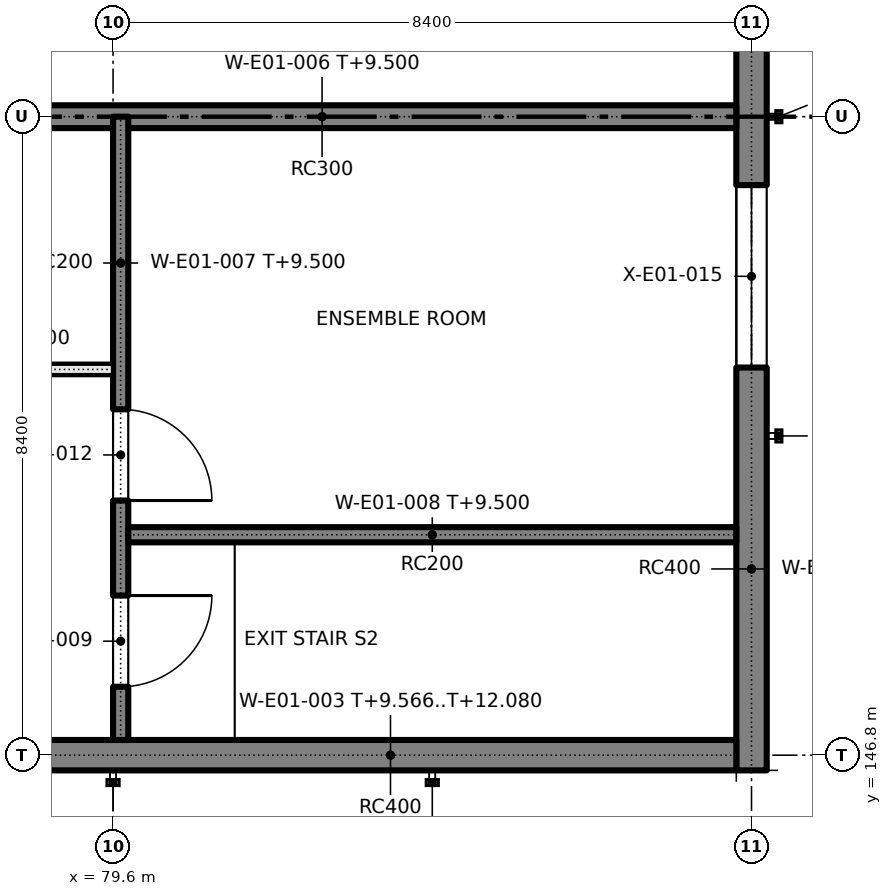
"""IFC4 building model, lengths in metres.
Left out: names, types, materials, properties, quantities, classifications, styles, units other than length and angle.
Written with IfcOpenShell. Run it as: python <this file> out.ifc"""

import sys

from ifc_helpers import new_model, si_unit, direction, frame, frame_2d, origin, place, context, subcontext, project, spatial, polyline, rectangle, outline, extrude, element, fill, save


model = new_model("IFC4")
c1 = context("Model", 3, precision=1e-05, world=origin(), true_north=direction((0.0, 1.0)))
c2 = subcontext(c1, "Body", "Model", "MODEL_VIEW")
j1 = project(units=[si_unit("LENGTHUNIT", "METRE"), si_unit("PLANEANGLEUNIT", "RADIAN")], contexts=[c1])
p1 = place(None, origin())
s1 = spatial("IfcSite", under=j1, at=p1, CompositionType="ELEMENT")
p2 = place(p1, origin())
s2 = spatial("IfcBuilding", under=s1, at=p2, CompositionType="ELEMENT")
p3 = place(p2, frame((0.0, 0.0, 5.4)))
s3 = spatial("IfcBuildingStorey", under=s2, at=p3, CompositionType="ELEMENT", Elevation=5.4)
p4 = place(p3, frame((88.0, 146.6, 0.0), z_axis=(0.0, 0.0, 1.0), x_axis=(0.0, 1.0, 0.0)))
e1 = element("IfcWall", 1, at=p4, inside=s3, PredefinedType="SOLIDWALL", context=c2, shape_type="SweptSolid", body=[
    extrude(rectangle(XDim=25.6, YDim=0.4, at=frame_2d((12.8, 0.0))), origin(), (0.0, 0.0, 1.0), 4.1),
])
p5 = place(p4, frame((5.3, 0.0, 0.9)))
e2 = element("IfcOpeningElement", 2, at=p5, cuts=e1, PredefinedType="OPENING", context=c2, shape_type="SweptSolid", body=[
    extrude(rectangle(XDim=2.4, YDim=2.4, at=frame_2d((1.2, 1.2))), frame((0.0, 0.21, 0.0), z_axis=(0.0, -1.0, 0.0), x_axis=(1.0, 0.0, 0.0)), (0.0, 0.0, 1.0), 0.42),
])
p6 = place(p4, frame((9.5, 0.0, 1.5)))
e3 = element("IfcOpeningElement", 3, at=p6, cuts=e1, PredefinedType="OPENING", context=c2, shape_type="SweptSolid", body=[
    extrude(rectangle(XDim=2.4, YDim=2.1, at=frame_2d((1.2, 1.05))), frame((0.0, 0.21, 0.0), z_axis=(0.0, -1.0, 0.0), x_axis=(1.0, 0.0, 0.0)), (0.0, 0.0, 1.0), 0.42),
])
p7 = place(p4, frame((13.7, 0.0, 1.5)))
e4 = element("IfcOpeningElement", 4, at=p7, cuts=e1, PredefinedType="OPENING", context=c2, shape_type="SweptSolid", body=[
    extrude(rectangle(XDim=2.4, YDim=2.1, at=frame_2d((1.2, 1.05))), frame((0.0, 0.21, 0.0), z_axis=(0.0, -1.0, 0.0), x_axis=(1.0, 0.0, 0.0)), (0.0, 0.0, 1.0), 0.42),
])
p8 = place(p4, frame((17.9, 0.0, 1.5)))
e5 = element("IfcOpeningElement", 5, at=p8, cuts=e1, PredefinedType="OPENING", context=c2, shape_type="SweptSolid", body=[
    extrude(rectangle(XDim=2.4, YDim=2.1, at=frame_2d((1.2, 1.05))), frame((0.0, 0.21, 0.0), z_axis=(0.0, -1.0, 0.0), x_axis=(1.0, 0.0, 0.0)), (0.0, 0.0, 1.0), 0.42),
])
p9 = place(p4, frame((22.1, 0.0, 1.5)))
e6 = element("IfcOpeningElement", 6, at=p9, cuts=e1, PredefinedType="OPENING", context=c2, shape_type="SweptSolid", body=[
    extrude(rectangle(XDim=2.4, YDim=2.1, at=frame_2d((1.2, 1.05))), frame((0.0, 0.21, 0.0), z_axis=(0.0, -1.0, 0.0), x_axis=(1.0, 0.0, 0.0)), (0.0, 0.0, 1.0), 0.42),
])
p10 = place(p3, frame((63.0, 146.8, 0.0), z_axis=(0.0, 0.0, 1.0), x_axis=(1.0, 0.0, 0.0)))
e7 = element("IfcWall", 7, at=p10, inside=s3, PredefinedType="SOLIDWALL", context=c2, shape_type="SweptSolid", body=[
    extrude(outline(polyline([(0.0, 0.0), (24.8, 0.0), (24.8, 4.166), (22.802, 4.935), (20.721, 5.574), (18.641, 6.063), (16.561, 6.407), (14.48, 6.612), (12.4, 6.68), (10.32, 6.612), (8.239, 6.407), (6.159, 6.063), (4.079, 5.574), (1.998, 4.935), (0.0, 4.166), (0.0, 0.0)])), frame((0.0, 0.2, 0.0), z_axis=(0.0, -1.0, 0.0), x_axis=(1.0, 0.0, 0.0)), (0.0, 0.0, 1.0), 0.4),
])
p11 = place(p10, frame((0.7, 0.0, 0.9)))
e8 = element("IfcOpeningElement", 8, at=p11, cuts=e7, PredefinedType="OPENING", context=c2, shape_type="SweptSolid", body=[
    extrude(rectangle(XDim=2.4, YDim=2.4, at=frame_2d((1.2, 1.2))), frame((0.0, 0.21, 0.0), z_axis=(0.0, -1.0, 0.0), x_axis=(1.0, 0.0, 0.0)), (0.0, 0.0, 1.0), 0.42),
])
p12 = place(p10, frame((4.9, 0.0, 0.9)))
e9 = element("IfcOpeningElement", 9, at=p12, cuts=e7, PredefinedType="OPENING", context=c2, shape_type="SweptSolid", body=[
    extrude(rectangle(XDim=2.4, YDim=2.4, at=frame_2d((1.2, 1.2))), frame((0.0, 0.21, 0.0), z_axis=(0.0, -1.0, 0.0), x_axis=(1.0, 0.0, 0.0)), (0.0, 0.0, 1.0), 0.42),
])
p13 = place(p10, frame((9.1, 0.0, 0.9)))
e10 = element("IfcOpeningElement", 10, at=p13, cuts=e7, PredefinedType="OPENING", context=c2, shape_type="SweptSolid", body=[
    extrude(rectangle(XDim=2.4, YDim=2.4, at=frame_2d((1.2, 1.2))), frame((0.0, 0.21, 0.0), z_axis=(0.0, -1.0, 0.0), x_axis=(1.0, 0.0, 0.0)), (0.0, 0.0, 1.0), 0.42),
])
p14 = place(p10, frame((13.3, 0.0, 0.9)))
e11 = element("IfcOpeningElement", 11, at=p14, cuts=e7, PredefinedType="OPENING", context=c2, shape_type="SweptSolid", body=[
    extrude(rectangle(XDim=2.4, YDim=2.4, at=frame_2d((1.2, 1.2))), frame((0.0, 0.21, 0.0), z_axis=(0.0, -1.0, 0.0), x_axis=(1.0, 0.0, 0.0)), (0.0, 0.0, 1.0), 0.42),
])
p15 = place(p3, frame((71.25, 155.2, 0.0), z_axis=(0.0, 0.0, 1.0), x_axis=(1.0, 0.0, 0.0)))
e12 = element("IfcWall", 12, at=p15, inside=s3, PredefinedType="SOLIDWALL", context=c2, shape_type="SweptSolid", body=[
    extrude(rectangle(XDim=16.55, YDim=0.3, at=frame_2d((8.275, 0.0))), origin(), (0.0, 0.0, 1.0), 4.1),
])
p16 = place(p15, frame((2.65, 0.0, 1.2)))
e13 = element("IfcOpeningElement", 13, at=p16, cuts=e12, PredefinedType="OPENING", context=c2, shape_type="SweptSolid", body=[
    extrude(rectangle(XDim=3.0, YDim=1.2, at=frame_2d((1.5, 0.6))), frame((0.0, 0.16, 0.0), z_axis=(0.0, -1.0, 0.0), x_axis=(1.0, 0.0, 0.0)), (0.0, 0.0, 1.0), 0.32),
])
p17 = place(p3, frame((79.7, 147.0, 0.0), z_axis=(0.0, 0.0, 1.0), x_axis=(0.0, 1.0, 0.0)))
e14 = element("IfcWall", 14, at=p17, inside=s3, PredefinedType="SOLIDWALL", context=c2, shape_type="SweptSolid", body=[
    extrude(rectangle(XDim=8.2, YDim=0.2, at=frame_2d((4.1, 0.0))), origin(), (0.0, 0.0, 1.0), 4.1),
])
p18 = place(p17, frame((0.7, 0.0, 0.0)))
e15 = element("IfcOpeningElement", 15, at=p18, cuts=e14, PredefinedType="OPENING", context=c2, shape_type="SweptSolid", body=[
    extrude(rectangle(XDim=1.2, YDim=2.1, at=frame_2d((0.6, 1.05))), frame((0.0, 0.11, 0.0), z_axis=(0.0, -1.0, 0.0), x_axis=(1.0, 0.0, 0.0)), (0.0, 0.0, 1.0), 0.22),
])
p19 = place(p17, frame((3.15, 0.0, 0.0)))
e16 = element("IfcOpeningElement", 16, at=p19, cuts=e14, PredefinedType="OPENING", context=c2, shape_type="SweptSolid", body=[
    extrude(rectangle(XDim=1.2, YDim=2.1, at=frame_2d((0.6, 1.05))), frame((0.0, 0.11, 0.0), z_axis=(0.0, -1.0, 0.0), x_axis=(1.0, 0.0, 0.0)), (0.0, 0.0, 1.0), 0.22),
])
p20 = place(p3, frame((79.8, 149.7, 0.0), z_axis=(0.0, 0.0, 1.0), x_axis=(1.0, 0.0, 0.0)))
e17 = element("IfcWall", 17, at=p20, inside=s3, PredefinedType="SOLIDWALL", context=c2, shape_type="SweptSolid", body=[
    extrude(rectangle(XDim=8.0, YDim=0.2, at=frame_2d((4.0, 0.0))), origin(), (0.0, 0.0, 1.0), 4.1),
])
p21 = place(p3, frame((71.25, 151.875, 0.0), z_axis=(0.0, 0.0, 1.0), x_axis=(1.0, 0.0, 0.0)))
e18 = element("IfcWall", 18, at=p21, inside=s3, PredefinedType="PARTITIONING", context=c2, shape_type="SweptSolid", body=[
    extrude(rectangle(XDim=8.35, YDim=0.15, at=frame_2d((4.175, 0.0))), origin(), (0.0, 0.0, 1.0), 4.1),
])
p22 = place(p21, frame((3.65, 0.0, 0.0)))
e19 = element("IfcOpeningElement", 19, at=p22, cuts=e18, PredefinedType="OPENING", context=c2, shape_type="SweptSolid", body=[
    extrude(rectangle(XDim=1.0, YDim=2.1, at=frame_2d((0.5, 1.05))), frame((0.0, 0.085, 0.0), z_axis=(0.0, -1.0, 0.0), x_axis=(1.0, 0.0, 0.0)), (0.0, 0.0, 1.0), 0.17),
])
p23 = place(p5, origin())
e20 = element("IfcWindow", 20, at=p23, inside=s3, PartitioningType="SINGLE_PANEL", PredefinedType="WINDOW", context=c2, shape_type="SweptSolid", body=[
    extrude(rectangle(XDim=2.4, YDim=2.4, at=frame_2d((1.2, 1.2))), frame((0.0, 0.03, 0.0), z_axis=(0.0, -1.0, 0.0), x_axis=(1.0, 0.0, 0.0)), (0.0, 0.0, 1.0), 0.06),
])
fill(e2, e20)
p24 = place(p18, frame((1.2, 0.0, 0.0), z_axis=(0.0, 0.0, 1.0), x_axis=(-1.0, 0.0, 0.0)))
e21 = element("IfcDoor", 21, at=p24, inside=s3, OperationType="SINGLE_SWING_LEFT", PredefinedType="DOOR", context=c2, shape_type="SweptSolid", body=[
    extrude(rectangle(XDim=1.2, YDim=2.1, at=frame_2d((0.6, 1.05))), frame((0.0, 0.025, 0.0), z_axis=(0.0, -1.0, 0.0), x_axis=(1.0, 0.0, 0.0)), (0.0, 0.0, 1.0), 0.05),
])
fill(e15, e21)
p25 = place(p19, frame((1.2, 0.0, 0.0), z_axis=(0.0, 0.0, 1.0), x_axis=(-1.0, 0.0, 0.0)))
e22 = element("IfcDoor", 22, at=p25, inside=s3, OperationType="SINGLE_SWING_RIGHT", PredefinedType="DOOR", context=c2, shape_type="SweptSolid", body=[
    extrude(rectangle(XDim=1.2, YDim=2.1, at=frame_2d((0.6, 1.05))), frame((0.0, 0.025, 0.0), z_axis=(0.0, -1.0, 0.0), x_axis=(1.0, 0.0, 0.0)), (0.0, 0.0, 1.0), 0.05),
])
fill(e16, e22)
save(model, sys.argv[1])
